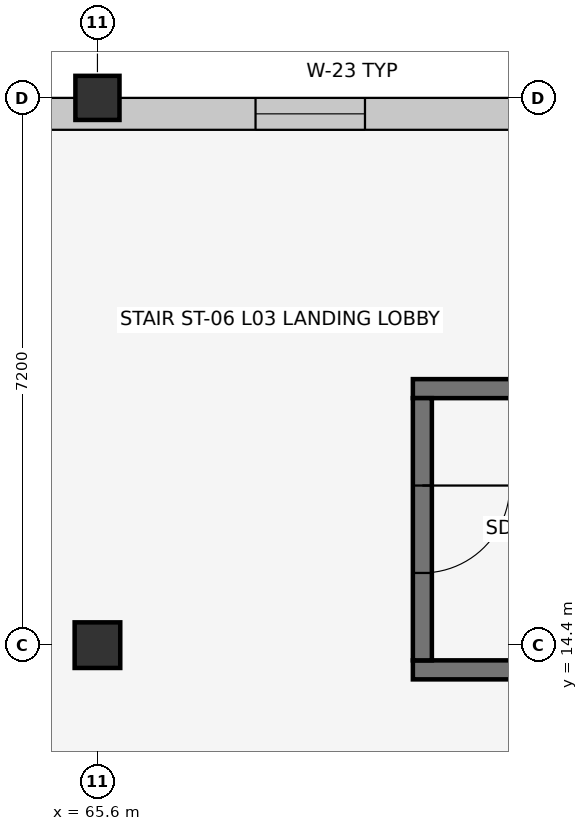
"""IFC4 building model, lengths in metres.
Left out: names, types, materials, properties, quantities, classifications, styles, units other than length and angle.
Written with IfcOpenShell. Run it as: python <this file> out.ifc"""

import sys

from ifc_helpers import new_model, si_unit, direction, frame, frame_2d, origin, origin_2d, place, context, subcontext, project, spatial, rectangle, extrude, element, fill, save


model = new_model("IFC4")
c1 = context("Model", 3, precision=1e-05, world=origin(), true_north=direction((0.0, 1.0)))
c2 = subcontext(c1, "Body", "Model", "MODEL_VIEW")
j1 = project(units=[si_unit("LENGTHUNIT", "METRE"), si_unit("PLANEANGLEUNIT", "RADIAN")], contexts=[c1])
p1 = place(None, origin())
s1 = spatial("IfcSite", under=j1, at=p1, CompositionType="ELEMENT")
p2 = place(p1, origin())
s2 = spatial("IfcBuilding", under=s1, at=p2, CompositionType="ELEMENT")
p3 = place(p2, frame((0.0, 0.0, 13.8)))
s3 = spatial("IfcBuildingStorey", under=s2, at=p3, CompositionType="ELEMENT", Elevation=13.8)
p4 = place(p3, frame((65.6, 14.4, 0.0), z_axis=(0.0, 0.0, 1.0), x_axis=(1.0, 0.0, 0.0)))
e1 = element("IfcColumn", 1, at=p4, inside=s3, PredefinedType="COLUMN", context=c2, shape_type="SweptSolid", body=[
    extrude(rectangle(XDim=0.6, YDim=0.6, at=origin_2d()), origin(), (0.0, 0.0, 1.0), 4.2),
])
p5 = place(p3, frame((65.6, 21.6, 0.0), z_axis=(0.0, 0.0, 1.0), x_axis=(1.0, 0.0, 0.0)))
e2 = element("IfcColumn", 2, at=p5, inside=s3, PredefinedType="COLUMN", context=c2, shape_type="SweptSolid", body=[
    extrude(rectangle(XDim=0.58, YDim=0.58, at=origin_2d()), origin(), (0.0, 0.0, 1.0), 4.2),
])
p6 = place(p3, frame((58.4, 21.39, 0.0), z_axis=(0.0, 0.0, 1.0), x_axis=(1.0, 0.0, 0.0)))
e3 = element("IfcWall", 3, at=p6, inside=s3, PredefinedType="SOLIDWALL", context=c2, shape_type="SweptSolid", body=[
    extrude(rectangle(XDim=36.0, YDim=0.42, at=frame_2d((18.0, 0.0))), origin(), (0.0, 0.0, 1.0), 3.175),
])
p7 = place(p6, frame((1.38, 0.0, 0.9)))
e4 = element("IfcOpeningElement", 4, at=p7, cuts=e3, PredefinedType="OPENING", context=c2, shape_type="SweptSolid", body=[
    extrude(rectangle(XDim=1.24, YDim=1.75, at=frame_2d((0.62, 0.875))), frame((0.0, 0.222, 0.0), z_axis=(0.0, -1.0, 0.0), x_axis=(1.0, 0.0, 0.0)), (0.0, 0.0, 1.0), 0.444),
])
p8 = place(p6, frame((9.28, 0.0, 0.9)))
e5 = element("IfcOpeningElement", 5, at=p8, cuts=e3, PredefinedType="OPENING", context=c2, shape_type="SweptSolid", body=[
    extrude(rectangle(XDim=1.44, YDim=1.75, at=frame_2d((0.72, 0.875))), frame((0.0, 0.222, 0.0), z_axis=(0.0, -1.0, 0.0), x_axis=(1.0, 0.0, 0.0)), (0.0, 0.0, 1.0), 0.444),
])
p9 = place(p6, frame((17.55, 0.0, 0.9)))
e6 = element("IfcOpeningElement", 6, at=p9, cuts=e3, PredefinedType="OPENING", context=c2, shape_type="SweptSolid", body=[
    extrude(rectangle(XDim=0.9, YDim=1.35, at=frame_2d((0.45, 0.675))), frame((0.0, 0.222, 0.0), z_axis=(0.0, -1.0, 0.0), x_axis=(1.0, 0.0, 0.0)), (0.0, 0.0, 1.0), 0.444),
])
p10 = place(p6, frame((33.35, 0.0, 0.9)))
e7 = element("IfcOpeningElement", 7, at=p10, cuts=e3, PredefinedType="OPENING", context=c2, shape_type="SweptSolid", body=[
    extrude(rectangle(XDim=1.3, YDim=1.35, at=frame_2d((0.65, 0.675))), frame((0.0, 0.222, 0.0), z_axis=(0.0, -1.0, 0.0), x_axis=(1.0, 0.0, 0.0)), (0.0, 0.0, 1.0), 0.444),
])
for number, where, z_axis, x_axis in (
    (8, (69.75, 14.075, 0.0), (0.0, 0.0, 1.0), (1.0, 0.0, 0.0)),
    (9, (78.65, 17.775, 0.0), (0.0, 0.0, 1.0), (-1.0, 0.0, 0.0)),
):
    element("IfcWall", number, at=place(p3, frame(where, z_axis=z_axis, x_axis=x_axis)), inside=s3, PredefinedType="SHEAR", context=c2, shape_type="SweptSolid", body=[
        extrude(rectangle(XDim=8.9, YDim=0.25, at=frame_2d((4.45, 0.0))), origin(), (0.0, 0.0, 1.0), 3.88),
    ])
p11 = place(p3, frame((69.875, 17.65, 0.0), z_axis=(0.0, 0.0, 1.0), x_axis=(0.0, -1.0, 0.0)))
e10 = element("IfcWall", 10, at=p11, inside=s3, PredefinedType="SHEAR", context=c2, shape_type="SweptSolid", body=[
    extrude(rectangle(XDim=3.45, YDim=0.25, at=frame_2d((1.725, 0.0))), origin(), (0.0, 0.0, 1.0), 3.88),
])
p12 = place(p11, frame((1.15, 0.0, 0.0)))
e11 = element("IfcOpeningElement", 11, at=p12, cuts=e10, PredefinedType="OPENING", context=c2, shape_type="SweptSolid", body=[
    extrude(rectangle(XDim=1.15, YDim=2.15, at=frame_2d((0.575, 1.075))), frame((0.0, 0.137, 0.0), z_axis=(0.0, -1.0, 0.0), x_axis=(1.0, 0.0, 0.0)), (0.0, 0.0, 1.0), 0.274),
])
p13 = place(p8, origin())
e12 = element("IfcWindow", 12, at=p13, inside=s3, PartitioningType="SINGLE_PANEL", PredefinedType="WINDOW", context=c2, shape_type="SweptSolid", body=[
    extrude(rectangle(XDim=1.44, YDim=1.75, at=frame_2d((0.72, 0.875))), frame((0.0, 0.03, 0.0), z_axis=(0.0, -1.0, 0.0), x_axis=(1.0, 0.0, 0.0)), (0.0, 0.0, 1.0), 0.06),
])
fill(e5, e12)
p14 = place(p12, origin())
e13 = element("IfcDoor", 13, at=p14, inside=s3, OperationType="SINGLE_SWING_LEFT", PredefinedType="DOOR", context=c2, shape_type="SweptSolid", body=[
    extrude(rectangle(XDim=1.15, YDim=2.15, at=frame_2d((0.575, 1.075))), frame((0.0, 0.025, 0.0), z_axis=(0.0, -1.0, 0.0), x_axis=(1.0, 0.0, 0.0)), (0.0, 0.0, 1.0), 0.05),
])
fill(e11, e13)
save(model, sys.argv[1])
